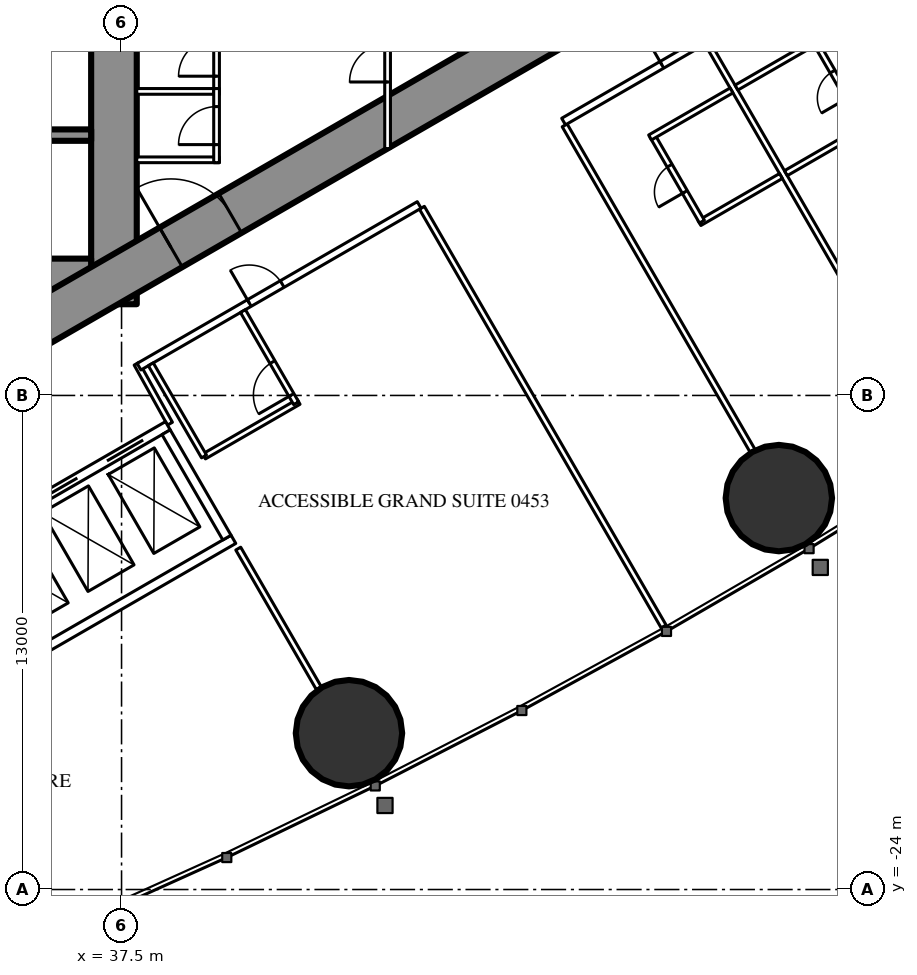
"""IFC4 building model, lengths in metres.
Left out: names, types, materials, properties, quantities, classifications, styles, units other than length and angle.
Written with IfcOpenShell. Run it as: python <this file> out.ifc"""

import sys

from ifc_helpers import new_model, si_unit, direction, frame, frame_2d, origin, origin_2d, place, context, subcontext, project, spatial, rectangle, hollow_circle, extrude, element, fill, save


model = new_model("IFC4")
c1 = context("Model", 3, precision=1e-05, world=origin(), true_north=direction((0.0, 1.0)))
c2 = subcontext(c1, "Body", "Model", "MODEL_VIEW")
j1 = project(units=[si_unit("LENGTHUNIT", "METRE"), si_unit("PLANEANGLEUNIT", "RADIAN")], contexts=[c1])
p1 = place(None, origin())
s1 = spatial("IfcSite", under=j1, at=p1, CompositionType="ELEMENT")
p2 = place(p1, origin())
s2 = spatial("IfcBuilding", under=s1, at=p2, CompositionType="ELEMENT")
p3 = place(p2, frame((0.0, 0.0, 21.5)))
s3 = spatial("IfcBuildingStorey", under=s2, at=p3, CompositionType="ELEMENT", Elevation=21.5)
for number, where, z_axis, x_axis in (
    (1, (43.484, -19.886, 0.0), (0.0, 0.0, 1.0), (1.0, 0.0, 0.0)),
    (2, (54.795, -13.701, 0.0), (0.0, 0.0, 1.0), (1.0, 0.0, 0.0)),
):
    element("IfcColumn", number, at=place(p3, frame(where, z_axis=z_axis, x_axis=x_axis)), inside=s3, PredefinedType="COLUMN", context=c2, shape_type="SweptSolid", body=[
        extrude(hollow_circle(Radius=1.4, WallThickness=0.12, at=origin_2d()), origin(), (0.0, 0.0, 1.0), 3.5),
    ])
p4 = place(p3, frame((37.3, -8.6, 0.0), z_axis=(0.0, 0.0, 1.0), x_axis=(0.0, 1.0, 0.0)))
e3 = element("IfcWall", 3, at=p4, inside=s3, PredefinedType="SHEAR", context=c2, shape_type="SweptSolid", body=[
    extrude(rectangle(XDim=17.2, YDim=1.2, at=frame_2d((8.6, 0.0))), origin(), (0.0, 0.0, 1.0), 3.5),
])
p5 = place(p4, frame((7.7, 0.0, 0.0)))
e4 = element("IfcOpeningElement", 4, at=p5, cuts=e3, PredefinedType="OPENING", context=c2, shape_type="SweptSolid", body=[
    extrude(rectangle(XDim=1.8, YDim=2.2, at=frame_2d((0.9, 1.1))), frame((0.0, 0.61, 0.0), z_axis=(0.0, -1.0, 0.0), x_axis=(1.0, 0.0, 0.0)), (0.0, 0.0, 1.0), 1.22),
])
p6 = place(p3, frame((28.3, -8.0, 0.0), z_axis=(0.0, 0.0, 1.0), x_axis=(1.0, 0.0, 0.0)))
e5 = element("IfcWall", 5, at=p6, inside=s3, PredefinedType="SHEAR", context=c2, shape_type="SweptSolid", body=[
    extrude(rectangle(XDim=8.4, YDim=1.2, at=frame_2d((4.2, 0.0))), origin(), (0.0, 0.0, 1.0), 3.5),
])
p7 = place(p6, frame((0.25, 0.0, 0.0)))
e6 = element("IfcOpeningElement", 6, at=p7, cuts=e5, PredefinedType="OPENING", context=c2, shape_type="SweptSolid", body=[
    extrude(rectangle(XDim=1.0, YDim=2.2, at=frame_2d((0.5, 1.1))), frame((0.0, 0.61, 0.0), z_axis=(0.0, -1.0, 0.0), x_axis=(1.0, 0.0, 0.0)), (0.0, 0.0, 1.0), 1.22),
])
p8 = place(p3, frame((28.3, -4.15, 0.0), z_axis=(0.0, 0.0, 1.0), x_axis=(1.0, 0.0, 0.0)))
e7 = element("IfcWall", 7, at=p8, inside=s3, PredefinedType="SHEAR", context=c2, shape_type="SweptSolid", body=[
    extrude(rectangle(XDim=8.4, YDim=0.3, at=frame_2d((4.2, 0.0))), origin(), (0.0, 0.0, 1.0), 3.5),
])
p9 = place(p3, frame((27.2, -13.8, 0.0), z_axis=(0.0, 0.0, 1.0), x_axis=(0.866027159892, 0.499996958321, 0.0)))
e8 = element("IfcWall", 8, at=p9, inside=s3, PredefinedType="SHEAR", context=c2, shape_type="SweptSolid", body=[
    extrude(rectangle(XDim=27.947, YDim=1.2, at=frame_2d((13.973, 0.0))), origin(), (0.0, 0.0, 1.0), 3.5),
])
p10 = place(p9, frame((4.6, 0.0, 0.0)))
e9 = element("IfcOpeningElement", 9, at=p10, cuts=e8, PredefinedType="OPENING", context=c2, shape_type="SweptSolid", body=[
    extrude(rectangle(XDim=1.0, YDim=2.2, at=frame_2d((0.5, 1.1))), frame((0.0, 0.61, 0.0), z_axis=(0.0, -1.0, 0.0), x_axis=(1.0, 0.0, 0.0)), (0.0, 0.0, 1.0), 1.22),
])
p11 = place(p9, frame((13.395, 0.0, 0.0)))
e10 = element("IfcOpeningElement", 10, at=p11, cuts=e8, PredefinedType="OPENING", context=c2, shape_type="SweptSolid", body=[
    extrude(rectangle(XDim=1.8, YDim=2.2, at=frame_2d((0.9, 1.1))), frame((0.0, 0.61, 0.0), z_axis=(0.0, -1.0, 0.0), x_axis=(1.0, 0.0, 0.0)), (0.0, 0.0, 1.0), 1.22),
])
p12 = place(p3, frame((45.403, -6.062, 0.0), z_axis=(0.0, 0.0, 1.0), x_axis=(0.500007077968, -0.866021317279, 0.0)))
e11 = element("IfcWall", 11, at=p12, inside=s3, PredefinedType="PARTITIONING", context=c2, shape_type="SweptSolid", body=[
    extrude(rectangle(XDim=12.721, YDim=0.15, at=frame_2d((6.361, 0.0))), origin(), (0.0, 0.0, 1.0), 3.25),
])
p13 = place(p3, frame((49.159, -3.893, 0.0), z_axis=(0.0, 0.0, 1.0), x_axis=(0.499998773722, -0.866026111775, 0.0)))
e12 = element("IfcWall", 12, at=p13, inside=s3, PredefinedType="PARTITIONING", context=c2, shape_type="SweptSolid", body=[
    extrude(rectangle(XDim=9.892, YDim=0.15, at=frame_2d((4.946, 0.0))), origin(), (0.0, 0.0, 1.0), 2.25),
])
p14 = place(p3, frame((52.915, -1.725, 0.0), z_axis=(0.0, 0.0, 1.0), x_axis=(0.499997163113, -0.866027041656, 0.0)))
e13 = element("IfcWall", 13, at=p14, inside=s3, PredefinedType="PARTITIONING", context=c2, shape_type="SweptSolid", body=[
    extrude(rectangle(XDim=12.591, YDim=0.15, at=frame_2d((6.295, 0.0))), origin(), (0.0, 0.0, 1.0), 3.25),
])
p15 = place(p3, frame((40.57, -15.03, 0.0), z_axis=(0.0, 0.0, 1.0), x_axis=(0.500012993597, -0.866017901798, 0.0)))
e14 = element("IfcWall", 14, at=p15, inside=s3, PredefinedType="PARTITIONING", context=c2, shape_type="SweptSolid", body=[
    extrude(rectangle(XDim=4.243, YDim=0.15, at=frame_2d((2.122, 0.0))), origin(), (0.0, 0.0, 1.0), 3.25),
])
p16 = place(p3, frame((38.773, -11.742, 0.0), z_axis=(0.0, 0.0, 1.0), x_axis=(-0.485528096672, 0.8742210632, 0.0)))
e15 = element("IfcWall", 15, at=p16, inside=s3, PredefinedType="PARTITIONING", context=c2, shape_type="SweptSolid", body=[
    extrude(rectangle(XDim=1.805, YDim=0.15, at=frame_2d((0.903, 0.0))), origin(), (0.0, 0.0, 1.0), 3.25),
])
p17 = place(p3, frame((37.96, -10.243, 0.0), z_axis=(0.0, 0.0, 1.0), x_axis=(0.866024617314, 0.500001362204, 0.0)))
e16 = element("IfcWall", 16, at=p17, inside=s3, PredefinedType="PARTITIONING", context=c2, shape_type="SweptSolid", body=[
    extrude(rectangle(XDim=8.512, YDim=0.2, at=frame_2d((4.256, 0.0))), origin(), (0.0, 0.0, 1.0), 3.25),
])
p18 = place(p17, frame((3.35, 0.0, 0.0)))
e17 = element("IfcOpeningElement", 17, at=p18, cuts=e16, PredefinedType="OPENING", context=c2, shape_type="SweptSolid", body=[
    extrude(rectangle(XDim=1.0, YDim=2.2, at=frame_2d((0.5, 1.1))), frame((0.0, 0.11, 0.0), z_axis=(0.0, -1.0, 0.0), x_axis=(1.0, 0.0, 0.0)), (0.0, 0.0, 1.0), 0.22),
])
p19 = place(p3, frame((49.131, -3.794, 0.0), z_axis=(0.0, 0.0, 1.0), x_axis=(0.866030732979, 0.499990769451, 0.0)))
e18 = element("IfcWall", 18, at=p19, inside=s3, PredefinedType="PARTITIONING", context=c2, shape_type="SweptSolid", body=[
    extrude(rectangle(XDim=7.588, YDim=0.2, at=frame_2d((3.794, 0.0))), origin(), (0.0, 0.0, 1.0), 3.25),
])
p20 = place(p19, frame((2.986, 0.0, 0.0)))
e19 = element("IfcOpeningElement", 19, at=p20, cuts=e18, PredefinedType="OPENING", context=c2, shape_type="SweptSolid", body=[
    extrude(rectangle(XDim=0.95, YDim=2.2, at=frame_2d((0.475, 1.1))), frame((0.0, 0.11, 0.0), z_axis=(0.0, -1.0, 0.0), x_axis=(1.0, 0.0, 0.0)), (0.0, 0.0, 1.0), 0.22),
])
p21 = place(p19, frame((4.686, 0.0, 0.0)))
e20 = element("IfcOpeningElement", 20, at=p21, cuts=e18, PredefinedType="OPENING", context=c2, shape_type="SweptSolid", body=[
    extrude(rectangle(XDim=0.95, YDim=2.2, at=frame_2d((0.475, 1.1))), frame((0.0, 0.11, 0.0), z_axis=(0.0, -1.0, 0.0), x_axis=(1.0, 0.0, 0.0)), (0.0, 0.0, 1.0), 0.22),
])
p22 = place(p3, frame((52.706, -6.464, 0.0), z_axis=(0.0, 0.0, 1.0), x_axis=(0.86604923931, 0.499958713387, 0.0)))
e21 = element("IfcWall", 21, at=p22, inside=s3, PredefinedType="PARTITIONING", context=c2, shape_type="SweptSolid", body=[
    extrude(rectangle(XDim=2.475, YDim=0.15, at=frame_2d((1.237, 0.0))), origin(), (0.0, 0.0, 1.0), 3.25),
])
p23 = place(p3, frame((51.471, -4.175, 0.0), z_axis=(0.0, 0.0, 1.0), x_axis=(0.500006934395, -0.866021400173, 0.0)))
e22 = element("IfcWall", 22, at=p23, inside=s3, PredefinedType="PARTITIONING", context=c2, shape_type="SweptSolid", body=[
    extrude(rectangle(XDim=2.6, YDim=0.15, at=frame_2d((1.3, 0.0))), origin(), (0.0, 0.0, 1.0), 3.25),
])
p24 = place(p23, frame((0.9, 0.0, 0.0)))
e23 = element("IfcOpeningElement", 23, at=p24, cuts=e22, PredefinedType="OPENING", context=c2, shape_type="SweptSolid", body=[
    extrude(rectangle(XDim=0.8, YDim=2.2, at=frame_2d((0.4, 1.1))), frame((0.0, 0.085, 0.0), z_axis=(0.0, -1.0, 0.0), x_axis=(1.0, 0.0, 0.0)), (0.0, 0.0, 1.0), 0.17),
])
p25 = place(p3, frame((51.406, -4.212, 0.0), z_axis=(0.0, 0.0, 1.0), x_axis=(0.866031185235, 0.4999899861, 0.0)))
e24 = element("IfcWall", 24, at=p25, inside=s3, PredefinedType="PARTITIONING", context=c2, shape_type="SweptSolid", body=[
    extrude(rectangle(XDim=2.475, YDim=0.15, at=frame_2d((1.238, 0.0))), origin(), (0.0, 0.0, 1.0), 3.25),
])
p26 = place(p3, frame((54.98, -5.151, 0.0), z_axis=(0.0, 0.0, 1.0), x_axis=(0.86604923931, 0.499958713387, 0.0)))
e25 = element("IfcWall", 25, at=p26, inside=s3, PredefinedType="PARTITIONING", context=c2, shape_type="SweptSolid", body=[
    extrude(rectangle(XDim=2.475, YDim=0.15, at=frame_2d((1.237, 0.0))), origin(), (0.0, 0.0, 1.0), 3.25),
])
p27 = place(p3, frame((55.758, -1.7, 0.0), z_axis=(0.0, 0.0, 1.0), x_axis=(0.500006934395, -0.866021400173, 0.0)))
e26 = element("IfcWall", 26, at=p27, inside=s3, PredefinedType="PARTITIONING", context=c2, shape_type="SweptSolid", body=[
    extrude(rectangle(XDim=2.6, YDim=0.15, at=frame_2d((1.3, 0.0))), origin(), (0.0, 0.0, 1.0), 3.25),
])
p28 = place(p27, frame((0.9, 0.0, 0.0)))
e27 = element("IfcOpeningElement", 27, at=p28, cuts=e26, PredefinedType="OPENING", context=c2, shape_type="SweptSolid", body=[
    extrude(rectangle(XDim=0.8, YDim=2.2, at=frame_2d((0.4, 1.1))), frame((0.0, 0.085, 0.0), z_axis=(0.0, -1.0, 0.0), x_axis=(1.0, 0.0, 0.0)), (0.0, 0.0, 1.0), 0.17),
])
p29 = place(p3, frame((53.68, -2.9, 0.0), z_axis=(0.0, 0.0, 1.0), x_axis=(0.866006523861, 0.500032699561, 0.0)))
e28 = element("IfcWall", 28, at=p29, inside=s3, PredefinedType="PARTITIONING", context=c2, shape_type="SweptSolid", body=[
    extrude(rectangle(XDim=2.475, YDim=0.15, at=frame_2d((1.237, 0.0))), origin(), (0.0, 0.0, 1.0), 3.25),
])
p30 = place(p3, frame((39.67, -12.605, 0.0), z_axis=(0.0, 0.0, 1.0), x_axis=(0.866018712932, 0.500011588718, 0.0)))
e29 = element("IfcWall", 29, at=p30, inside=s3, PredefinedType="PARTITIONING", context=c2, shape_type="SweptSolid", body=[
    extrude(rectangle(XDim=2.875, YDim=0.15, at=frame_2d((1.438, 0.0))), origin(), (0.0, 0.0, 1.0), 3.25),
])
p31 = place(p3, frame((40.695, -8.78, 0.0), z_axis=(0.0, 0.0, 1.0), x_axis=(0.500049511043, -0.865996816683, 0.0)))
e30 = element("IfcWall", 30, at=p31, inside=s3, PredefinedType="PARTITIONING", context=c2, shape_type="SweptSolid", body=[
    extrude(rectangle(XDim=2.8, YDim=0.15, at=frame_2d((1.4, 0.0))), origin(), (0.0, 0.0, 1.0), 3.25),
])
p32 = place(p31, frame((1.55, 0.0, 0.0)))
e31 = element("IfcOpeningElement", 31, at=p32, cuts=e30, PredefinedType="OPENING", context=c2, shape_type="SweptSolid", body=[
    extrude(rectangle(XDim=1.0, YDim=2.2, at=frame_2d((0.5, 1.1))), frame((0.0, 0.085, 0.0), z_axis=(0.0, -1.0, 0.0), x_axis=(1.0, 0.0, 0.0)), (0.0, 0.0, 1.0), 0.17),
])
p33 = place(p3, frame((38.27, -10.18, 0.0), z_axis=(0.0, 0.0, 1.0), x_axis=(0.500049511043, -0.865996816683, 0.0)))
e32 = element("IfcWall", 32, at=p33, inside=s3, PredefinedType="PARTITIONING", context=c2, shape_type="SweptSolid", body=[
    extrude(rectangle(XDim=2.8, YDim=0.15, at=frame_2d((1.4, 0.0))), origin(), (0.0, 0.0, 1.0), 3.25),
])
for number, where, z_axis, x_axis in (
    (33, (37.9, -3.0, 0.0), (0.0, 0.0, 1.0), (1.0, 0.0, 0.0)),
    (34, (37.9, -4.8, 0.0), (0.0, 0.0, 1.0), (1.0, 0.0, 0.0)),
):
    element("IfcWall", number, at=place(p3, frame(where, z_axis=z_axis, x_axis=x_axis)), inside=s3, PredefinedType="PARTITIONING", context=c2, shape_type="SweptSolid", body=[
        extrude(rectangle(XDim=2.175, YDim=0.15, at=frame_2d((1.087, 0.0))), origin(), (0.0, 0.0, 1.0), 3.25),
    ])
p34 = place(p3, frame((40.0, -3.075, 0.0), z_axis=(0.0, 0.0, 1.0), x_axis=(0.0, 1.0, 0.0)))
e35 = element("IfcWall", 35, at=p34, inside=s3, PredefinedType="PARTITIONING", context=c2, shape_type="SweptSolid", body=[
    extrude(rectangle(XDim=1.95, YDim=0.15, at=frame_2d((0.975, 0.0))), origin(), (0.0, 0.0, 1.0), 3.25),
])
p35 = place(p34, frame((0.475, 0.0, 0.0)))
e36 = element("IfcOpeningElement", 36, at=p35, cuts=e35, PredefinedType="OPENING", context=c2, shape_type="SweptSolid", body=[
    extrude(rectangle(XDim=1.0, YDim=2.2, at=frame_2d((0.5, 1.1))), frame((0.0, 0.085, 0.0), z_axis=(0.0, -1.0, 0.0), x_axis=(1.0, 0.0, 0.0)), (0.0, 0.0, 1.0), 0.17),
])
p36 = place(p3, frame((40.0, -4.875, 0.0), z_axis=(0.0, 0.0, 1.0), x_axis=(0.0, 1.0, 0.0)))
e37 = element("IfcWall", 37, at=p36, inside=s3, PredefinedType="PARTITIONING", context=c2, shape_type="SweptSolid", body=[
    extrude(rectangle(XDim=1.95, YDim=0.15, at=frame_2d((0.975, 0.0))), origin(), (0.0, 0.0, 1.0), 3.25),
])
p37 = place(p36, frame((0.475, 0.0, 0.0)))
e38 = element("IfcOpeningElement", 38, at=p37, cuts=e37, PredefinedType="OPENING", context=c2, shape_type="SweptSolid", body=[
    extrude(rectangle(XDim=1.0, YDim=2.2, at=frame_2d((0.5, 1.1))), frame((0.0, 0.085, 0.0), z_axis=(0.0, -1.0, 0.0), x_axis=(1.0, 0.0, 0.0)), (0.0, 0.0, 1.0), 0.17),
])
p38 = place(p3, frame((44.5, -4.505, 0.0), z_axis=(0.0, 0.0, 1.0), x_axis=(0.0, 1.0, 0.0)))
e39 = element("IfcWall", 39, at=p38, inside=s3, PredefinedType="PARTITIONING", context=c2, shape_type="SweptSolid", body=[
    extrude(rectangle(XDim=9.009, YDim=0.15, at=frame_2d((4.505, 0.0))), origin(), (0.0, 0.0, 1.0), 2.45),
])
p39 = place(p38, frame((1.752, 0.0, 0.0)))
e40 = element("IfcOpeningElement", 40, at=p39, cuts=e39, PredefinedType="OPENING", context=c2, shape_type="SweptSolid", body=[
    extrude(rectangle(XDim=1.0, YDim=2.2, at=frame_2d((0.5, 1.1))), frame((0.0, 0.085, 0.0), z_axis=(0.0, -1.0, 0.0), x_axis=(1.0, 0.0, 0.0)), (0.0, 0.0, 1.0), 0.17),
])
p40 = place(p38, frame((6.257, 0.0, 0.0)))
e41 = element("IfcOpeningElement", 41, at=p40, cuts=e39, PredefinedType="OPENING", context=c2, shape_type="SweptSolid", body=[
    extrude(rectangle(XDim=1.0, YDim=2.2, at=frame_2d((0.5, 1.1))), frame((0.0, 0.085, 0.0), z_axis=(0.0, -1.0, 0.0), x_axis=(1.0, 0.0, 0.0)), (0.0, 0.0, 1.0), 0.17),
])
p41 = place(p3, frame((31.271, -16.097, 0.0), z_axis=(0.0, 0.0, 1.0), x_axis=(0.86604045752, 0.499973925258, 0.0)))
e42 = element("IfcWall", 42, at=p41, inside=s3, PredefinedType="PARTITIONING", context=c2, shape_type="SweptSolid", body=[
    extrude(rectangle(XDim=8.6, YDim=0.25, at=frame_2d((4.3, 0.0))), origin(), (0.0, 0.0, 1.0), 3.25),
])
p42 = place(p41, frame((0.75, 0.0, 0.0)))
e43 = element("IfcOpeningElement", 43, at=p42, cuts=e42, PredefinedType="OPENING", context=c2, shape_type="SweptSolid", body=[
    extrude(rectangle(XDim=1.1, YDim=2.2, at=frame_2d((0.55, 1.1))), frame((0.0, 0.135, 0.0), z_axis=(0.0, -1.0, 0.0), x_axis=(1.0, 0.0, 0.0)), (0.0, 0.0, 1.0), 0.27),
])
p43 = place(p41, frame((2.75, 0.0, 0.0)))
e44 = element("IfcOpeningElement", 44, at=p43, cuts=e42, PredefinedType="OPENING", context=c2, shape_type="SweptSolid", body=[
    extrude(rectangle(XDim=1.1, YDim=2.2, at=frame_2d((0.55, 1.1))), frame((0.0, 0.135, 0.0), z_axis=(0.0, -1.0, 0.0), x_axis=(1.0, 0.0, 0.0)), (0.0, 0.0, 1.0), 0.27),
])
p44 = place(p41, frame((4.75, 0.0, 0.0)))
e45 = element("IfcOpeningElement", 45, at=p44, cuts=e42, PredefinedType="OPENING", context=c2, shape_type="SweptSolid", body=[
    extrude(rectangle(XDim=1.1, YDim=2.2, at=frame_2d((0.55, 1.1))), frame((0.0, 0.135, 0.0), z_axis=(0.0, -1.0, 0.0), x_axis=(1.0, 0.0, 0.0)), (0.0, 0.0, 1.0), 0.27),
])
p45 = place(p41, frame((6.75, 0.0, 0.0)))
e46 = element("IfcOpeningElement", 46, at=p45, cuts=e42, PredefinedType="OPENING", context=c2, shape_type="SweptSolid", body=[
    extrude(rectangle(XDim=1.1, YDim=2.2, at=frame_2d((0.55, 1.1))), frame((0.0, 0.135, 0.0), z_axis=(0.0, -1.0, 0.0), x_axis=(1.0, 0.0, 0.0)), (0.0, 0.0, 1.0), 0.27),
])
p46 = place(p3, frame((32.996, -19.086, 0.0), z_axis=(0.0, 0.0, 1.0), x_axis=(0.866028165386, 0.499995216735, 0.0)))
e47 = element("IfcWall", 47, at=p46, inside=s3, PredefinedType="PARTITIONING", context=c2, shape_type="SweptSolid", body=[
    extrude(rectangle(XDim=8.6, YDim=0.25, at=frame_2d((4.3, 0.0))), origin(), (0.0, 0.0, 1.0), 3.25),
])
p47 = place(p3, frame((38.673, -11.968, 0.0), z_axis=(0.0, 0.0, 1.0), x_axis=(0.499929347863, -0.866066190972, 0.0)))
e48 = element("IfcWall", 48, at=p47, inside=s3, PredefinedType="PARTITIONING", context=c2, shape_type="SweptSolid", body=[
    extrude(rectangle(XDim=3.201, YDim=0.25, at=frame_2d((1.6, 0.0))), origin(), (0.0, 0.0, 1.0), 3.25),
])
p48 = place(p24, origin())
e49 = element("IfcDoor", 49, at=p48, inside=s3, OperationType="SINGLE_SWING_RIGHT", PredefinedType="DOOR", context=c2, shape_type="SweptSolid", body=[
    extrude(rectangle(XDim=0.8, YDim=2.2, at=frame_2d((0.4, 1.1))), frame((0.0, 0.025, 0.0), z_axis=(0.0, -1.0, 0.0), x_axis=(1.0, 0.0, 0.0)), (0.0, 0.0, 1.0), 0.05),
])
fill(e23, e49)
p49 = place(p20, origin())
e50 = element("IfcDoor", 50, at=p49, inside=s3, OperationType="SINGLE_SWING_LEFT", PredefinedType="DOOR", context=c2, shape_type="SweptSolid", body=[
    extrude(rectangle(XDim=0.95, YDim=2.2, at=frame_2d((0.475, 1.1))), frame((0.0, 0.025, 0.0), z_axis=(0.0, -1.0, 0.0), x_axis=(1.0, 0.0, 0.0)), (0.0, 0.0, 1.0), 0.05),
])
fill(e19, e50)
p50 = place(p28, origin())
e51 = element("IfcDoor", 51, at=p50, inside=s3, OperationType="SINGLE_SWING_RIGHT", PredefinedType="DOOR", context=c2, shape_type="SweptSolid", body=[
    extrude(rectangle(XDim=0.8, YDim=2.2, at=frame_2d((0.4, 1.1))), frame((0.0, 0.025, 0.0), z_axis=(0.0, -1.0, 0.0), x_axis=(1.0, 0.0, 0.0)), (0.0, 0.0, 1.0), 0.05),
])
fill(e27, e51)
p51 = place(p32, origin())
e52 = element("IfcDoor", 52, at=p51, inside=s3, OperationType="SINGLE_SWING_RIGHT", PredefinedType="DOOR", context=c2, shape_type="SweptSolid", body=[
    extrude(rectangle(XDim=1.0, YDim=2.2, at=frame_2d((0.5, 1.1))), frame((0.0, 0.025, 0.0), z_axis=(0.0, -1.0, 0.0), x_axis=(1.0, 0.0, 0.0)), (0.0, 0.0, 1.0), 0.05),
])
fill(e31, e52)
p52 = place(p18, origin())
e53 = element("IfcDoor", 53, at=p52, inside=s3, OperationType="SINGLE_SWING_LEFT", PredefinedType="DOOR", context=c2, shape_type="SweptSolid", body=[
    extrude(rectangle(XDim=1.0, YDim=2.2, at=frame_2d((0.5, 1.1))), frame((0.0, 0.025, 0.0), z_axis=(0.0, -1.0, 0.0), x_axis=(1.0, 0.0, 0.0)), (0.0, 0.0, 1.0), 0.05),
])
fill(e17, e53)
p53 = place(p35, origin())
e54 = element("IfcDoor", 54, at=p53, inside=s3, OperationType="SINGLE_SWING_LEFT", PredefinedType="DOOR", context=c2, shape_type="SweptSolid", body=[
    extrude(rectangle(XDim=1.0, YDim=2.2, at=frame_2d((0.5, 1.1))), frame((0.0, 0.025, 0.0), z_axis=(0.0, -1.0, 0.0), x_axis=(1.0, 0.0, 0.0)), (0.0, 0.0, 1.0), 0.05),
])
fill(e36, e54)
p54 = place(p37, origin())
e55 = element("IfcDoor", 55, at=p54, inside=s3, OperationType="SINGLE_SWING_LEFT", PredefinedType="DOOR", context=c2, shape_type="SweptSolid", body=[
    extrude(rectangle(XDim=1.0, YDim=2.2, at=frame_2d((0.5, 1.1))), frame((0.0, 0.025, 0.0), z_axis=(0.0, -1.0, 0.0), x_axis=(1.0, 0.0, 0.0)), (0.0, 0.0, 1.0), 0.05),
])
fill(e38, e55)
p55 = place(p39, origin())
e56 = element("IfcDoor", 56, at=p55, inside=s3, OperationType="SINGLE_SWING_LEFT", PredefinedType="DOOR", context=c2, shape_type="SweptSolid", body=[
    extrude(rectangle(XDim=1.0, YDim=2.2, at=frame_2d((0.5, 1.1))), frame((0.0, 0.025, 0.0), z_axis=(0.0, -1.0, 0.0), x_axis=(1.0, 0.0, 0.0)), (0.0, 0.0, 1.0), 0.05),
])
fill(e40, e56)
p56 = place(p11, origin())
e57 = element("IfcDoor", 57, at=p56, inside=s3, OperationType="DOUBLE_DOOR_SINGLE_SWING", PredefinedType="DOOR", context=c2, shape_type="SweptSolid", body=[
    extrude(rectangle(XDim=1.8, YDim=2.2, at=frame_2d((0.9, 1.1))), frame((0.0, 0.025, 0.0), z_axis=(0.0, -1.0, 0.0), x_axis=(1.0, 0.0, 0.0)), (0.0, 0.0, 1.0), 0.05),
])
fill(e10, e57)
p57 = place(p44, origin())
e58 = element("IfcDoor", 58, at=p57, inside=s3, OperationType="DOUBLE_DOOR_SLIDING", PredefinedType="USERDEFINED", context=c2, shape_type="SweptSolid", body=[
    extrude(rectangle(XDim=1.1, YDim=2.2, at=frame_2d((0.55, 1.1))), frame((0.0, 0.025, 0.0), z_axis=(0.0, -1.0, 0.0), x_axis=(1.0, 0.0, 0.0)), (0.0, 0.0, 1.0), 0.05),
])
fill(e45, e58)
p58 = place(p45, origin())
e59 = element("IfcDoor", 59, at=p58, inside=s3, OperationType="DOUBLE_DOOR_SLIDING", PredefinedType="USERDEFINED", context=c2, shape_type="SweptSolid", body=[
    extrude(rectangle(XDim=1.1, YDim=2.2, at=frame_2d((0.55, 1.1))), frame((0.0, 0.025, 0.0), z_axis=(0.0, -1.0, 0.0), x_axis=(1.0, 0.0, 0.0)), (0.0, 0.0, 1.0), 0.05),
])
fill(e46, e59)
save(model, sys.argv[1])
